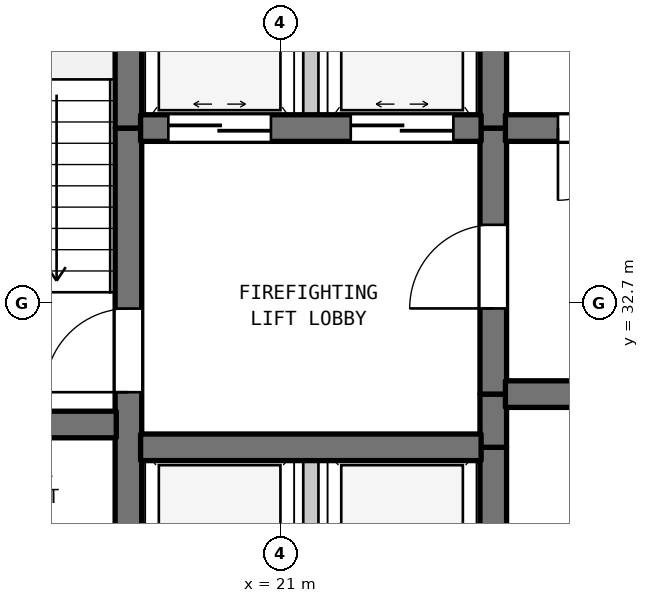
"""IFC4 building model, lengths in metres.
Left out: names, types, materials, properties, quantities, classifications, styles, units other than length and angle.
Written with IfcOpenShell. Run it as: python <this file> out.ifc"""

import sys

from ifc_helpers import new_model, si_unit, direction, frame, frame_2d, origin, place, context, subcontext, project, spatial, rectangle, extrude, element, fill, save


model = new_model("IFC4")
c1 = context("Model", 3, precision=1e-05, world=origin(), true_north=direction((0.0, 1.0)))
c2 = subcontext(c1, "Body", "Model", "MODEL_VIEW")
j1 = project(units=[si_unit("LENGTHUNIT", "METRE"), si_unit("PLANEANGLEUNIT", "RADIAN")], contexts=[c1])
p1 = place(None, origin())
s1 = spatial("IfcSite", under=j1, at=p1, CompositionType="ELEMENT")
p2 = place(p1, origin())
s2 = spatial("IfcBuilding", under=s1, at=p2, CompositionType="ELEMENT")
p3 = place(p2, frame((0.0, 0.0, 276.9)))
s3 = spatial("IfcBuildingStorey", under=s2, at=p3, CompositionType="ELEMENT", Elevation=276.9)
p4 = place(p3, frame((19.0, 29.5, 0.0), z_axis=(0.0, 0.0, 1.0), x_axis=(0.0, 1.0, 0.0)))
e1 = element("IfcWall", 1, at=p4, inside=s3, PredefinedType="SHEAR", context=c2, shape_type="SweptSolid", body=[
    extrude(rectangle(XDim=5.5, YDim=0.35, at=frame_2d((2.75, 0.0))), origin(), (0.0, 0.0, 1.0), 3.39),
])
p5 = place(p4, frame((2.025, 0.0, 0.0)))
e2 = element("IfcOpeningElement", 2, at=p5, cuts=e1, PredefinedType="OPENING", context=c2, shape_type="SweptSolid", body=[
    extrude(rectangle(XDim=1.1, YDim=2.15, at=frame_2d((0.55, 1.075))), frame((0.0, 0.185, 0.0), z_axis=(0.0, -1.0, 0.0), x_axis=(1.0, 0.0, 0.0)), (0.0, 0.0, 1.0), 0.37),
])
p6 = place(p3, frame((19.0, 35.0, 0.0), z_axis=(0.0, 0.0, 1.0), x_axis=(0.0, 1.0, 0.0)))
e3 = element("IfcWall", 3, at=p6, inside=s3, PredefinedType="SHEAR", context=c2, shape_type="SweptSolid", body=[
    extrude(rectangle(XDim=2.9, YDim=0.35, at=frame_2d((1.45, 0.0))), origin(), (0.0, 0.0, 1.0), 3.39),
])
p7 = place(p3, frame((21.4, 28.2, 0.0), z_axis=(0.0, 0.0, 1.0), x_axis=(0.0, 1.0, 0.0)))
e4 = element("IfcWall", 4, at=p7, inside=s3, PredefinedType="STANDARD", context=c2, shape_type="SweptSolid", body=[
    extrude(rectangle(XDim=2.6, YDim=0.2, at=frame_2d((1.3, 0.0))), origin(), (0.0, 0.0, 1.0), 3.39),
])
p8 = place(p3, frame((21.4, 35.0, 0.0), z_axis=(0.0, 0.0, 1.0), x_axis=(0.0, 1.0, 0.0)))
e5 = element("IfcWall", 5, at=p8, inside=s3, PredefinedType="STANDARD", context=c2, shape_type="SweptSolid", body=[
    extrude(rectangle(XDim=2.9, YDim=0.2, at=frame_2d((1.45, 0.0))), origin(), (0.0, 0.0, 1.0), 3.39),
])
p9 = place(p3, frame((23.8, 28.2, 0.0), z_axis=(0.0, 0.0, 1.0), x_axis=(0.0, 1.0, 0.0)))
e6 = element("IfcWall", 6, at=p9, inside=s3, PredefinedType="SHEAR", context=c2, shape_type="SweptSolid", body=[
    extrude(rectangle(XDim=2.6, YDim=0.35, at=frame_2d((1.3, 0.0))), origin(), (0.0, 0.0, 1.0), 3.39),
])
p10 = place(p3, frame((23.8, 30.8, 0.0), z_axis=(0.0, 0.0, 1.0), x_axis=(0.0, 1.0, 0.0)))
e7 = element("IfcWall", 7, at=p10, inside=s3, PredefinedType="SHEAR", context=c2, shape_type="SweptSolid", body=[
    extrude(rectangle(XDim=0.7, YDim=0.35, at=frame_2d((0.35, 0.0))), origin(), (0.0, 0.0, 1.0), 3.39),
])
p11 = place(p3, frame((23.8, 31.5, 0.0), z_axis=(0.0, 0.0, 1.0), x_axis=(0.0, 1.0, 0.0)))
e8 = element("IfcWall", 8, at=p11, inside=s3, PredefinedType="SHEAR", context=c2, shape_type="SweptSolid", body=[
    extrude(rectangle(XDim=3.5, YDim=0.35, at=frame_2d((1.75, 0.0))), origin(), (0.0, 0.0, 1.0), 3.39),
])
p12 = place(p11, frame((1.127, 0.0, 0.0)))
e9 = element("IfcOpeningElement", 9, at=p12, cuts=e8, PredefinedType="OPENING", context=c2, shape_type="SweptSolid", body=[
    extrude(rectangle(XDim=1.1, YDim=2.15, at=frame_2d((0.55, 1.075))), frame((0.0, 0.185, 0.0), z_axis=(0.0, -1.0, 0.0), x_axis=(1.0, 0.0, 0.0)), (0.0, 0.0, 1.0), 0.37),
])
p13 = place(p3, frame((23.8, 35.0, 0.0), z_axis=(0.0, 0.0, 1.0), x_axis=(0.0, 1.0, 0.0)))
e10 = element("IfcWall", 10, at=p13, inside=s3, PredefinedType="SHEAR", context=c2, shape_type="SweptSolid", body=[
    extrude(rectangle(XDim=2.9, YDim=0.35, at=frame_2d((1.45, 0.0))), origin(), (0.0, 0.0, 1.0), 3.39),
])
p14 = place(p3, frame((19.16, 30.8, 0.0), z_axis=(0.0, 0.0, 1.0), x_axis=(1.0, 0.0, 0.0)))
e11 = element("IfcWall", 11, at=p14, inside=s3, PredefinedType="SHEAR", context=c2, shape_type="SweptSolid", body=[
    extrude(rectangle(XDim=4.48, YDim=0.35, at=frame_2d((2.24, 0.0))), origin(), (0.0, 0.0, 1.0), 3.39),
])
p15 = place(p3, frame((15.16, 31.1, 0.0), z_axis=(0.0, 0.0, 1.0), x_axis=(1.0, 0.0, 0.0)))
e12 = element("IfcWall", 12, at=p15, inside=s3, PredefinedType="SHEAR", context=c2, shape_type="SweptSolid", body=[
    extrude(rectangle(XDim=3.68, YDim=0.35, at=frame_2d((1.84, 0.0))), origin(), (0.0, 0.0, 1.0), 3.39),
])
p16 = place(p3, frame((23.96, 31.5, 0.0), z_axis=(0.0, 0.0, 1.0), x_axis=(1.0, 0.0, 0.0)))
e13 = element("IfcWall", 13, at=p16, inside=s3, PredefinedType="SHEAR", context=c2, shape_type="SweptSolid", body=[
    extrude(rectangle(XDim=3.18, YDim=0.35, at=frame_2d((1.59, 0.0))), origin(), (0.0, 0.0, 1.0), 3.39),
])
p17 = place(p16, frame((1.094, 0.0, 0.0)))
e14 = element("IfcOpeningElement", 14, at=p17, cuts=e13, PredefinedType="OPENING", context=c2, shape_type="SweptSolid", body=[
    extrude(rectangle(XDim=0.85, YDim=2.1, at=frame_2d((0.425, 1.05))), frame((0.0, 0.185, 0.0), z_axis=(0.0, -1.0, 0.0), x_axis=(1.0, 0.0, 0.0)), (0.0, 0.0, 1.0), 0.37),
])
p18 = place(p3, frame((19.16, 35.0, 0.0), z_axis=(0.0, 0.0, 1.0), x_axis=(1.0, 0.0, 0.0)))
e15 = element("IfcWall", 15, at=p18, inside=s3, PredefinedType="SHEAR", context=c2, shape_type="SweptSolid", body=[
    extrude(rectangle(XDim=4.48, YDim=0.35, at=frame_2d((2.24, 0.0))), origin(), (0.0, 0.0, 1.0), 3.39),
])
p19 = place(p18, frame((0.365, 0.0, 0.0)))
e16 = element("IfcOpeningElement", 16, at=p19, cuts=e15, PredefinedType="OPENING", context=c2, shape_type="SweptSolid", body=[
    extrude(rectangle(XDim=1.35, YDim=2.2, at=frame_2d((0.675, 1.1))), frame((0.0, 0.185, 0.0), z_axis=(0.0, -1.0, 0.0), x_axis=(1.0, 0.0, 0.0)), (0.0, 0.0, 1.0), 0.37),
])
p20 = place(p18, frame((2.765, 0.0, 0.0)))
e17 = element("IfcOpeningElement", 17, at=p20, cuts=e15, PredefinedType="OPENING", context=c2, shape_type="SweptSolid", body=[
    extrude(rectangle(XDim=1.35, YDim=2.2, at=frame_2d((0.675, 1.1))), frame((0.0, 0.185, 0.0), z_axis=(0.0, -1.0, 0.0), x_axis=(1.0, 0.0, 0.0)), (0.0, 0.0, 1.0), 0.37),
])
p21 = place(p3, frame((23.96, 35.0, 0.0), z_axis=(0.0, 0.0, 1.0), x_axis=(1.0, 0.0, 0.0)))
e18 = element("IfcWall", 18, at=p21, inside=s3, PredefinedType="SHEAR", context=c2, shape_type="SweptSolid", body=[
    extrude(rectangle(XDim=2.595, YDim=0.35, at=frame_2d((1.297, 0.0))), origin(), (0.0, 0.0, 1.0), 3.39),
])
p22 = place(p21, frame((0.691, 0.0, 0.0)))
e19 = element("IfcOpeningElement", 19, at=p22, cuts=e18, PredefinedType="OPENING", context=c2, shape_type="SweptSolid", body=[
    extrude(rectangle(XDim=0.95, YDim=2.15, at=frame_2d((0.475, 1.075))), frame((0.0, 0.185, 0.0), z_axis=(0.0, -1.0, 0.0), x_axis=(1.0, 0.0, 0.0)), (0.0, 0.0, 1.0), 0.37),
])
p23 = place(p5, origin())
e20 = element("IfcDoor", 20, at=p23, inside=s3, OperationType="SINGLE_SWING_LEFT", PredefinedType="DOOR", context=c2, shape_type="SweptSolid", body=[
    extrude(rectangle(XDim=1.1, YDim=2.15, at=frame_2d((0.55, 1.075))), frame((0.0, 0.025, 0.0), z_axis=(0.0, -1.0, 0.0), x_axis=(1.0, 0.0, 0.0)), (0.0, 0.0, 1.0), 0.05),
])
fill(e2, e20)
p24 = place(p12, origin())
e21 = element("IfcDoor", 21, at=p24, inside=s3, OperationType="SINGLE_SWING_LEFT", PredefinedType="DOOR", context=c2, shape_type="SweptSolid", body=[
    extrude(rectangle(XDim=1.1, YDim=2.15, at=frame_2d((0.55, 1.075))), frame((0.0, 0.025, 0.0), z_axis=(0.0, -1.0, 0.0), x_axis=(1.0, 0.0, 0.0)), (0.0, 0.0, 1.0), 0.05),
])
fill(e9, e21)
p25 = place(p19, origin())
e22 = element("IfcDoor", 22, at=p25, inside=s3, OperationType="DOUBLE_DOOR_SLIDING", PredefinedType="DOOR", context=c2, shape_type="SweptSolid", body=[
    extrude(rectangle(XDim=1.35, YDim=2.2, at=frame_2d((0.675, 1.1))), frame((0.0, 0.025, 0.0), z_axis=(0.0, -1.0, 0.0), x_axis=(1.0, 0.0, 0.0)), (0.0, 0.0, 1.0), 0.05),
])
fill(e16, e22)
p26 = place(p20, origin())
e23 = element("IfcDoor", 23, at=p26, inside=s3, OperationType="DOUBLE_DOOR_SLIDING", PredefinedType="DOOR", context=c2, shape_type="SweptSolid", body=[
    extrude(rectangle(XDim=1.35, YDim=2.2, at=frame_2d((0.675, 1.1))), frame((0.0, 0.025, 0.0), z_axis=(0.0, -1.0, 0.0), x_axis=(1.0, 0.0, 0.0)), (0.0, 0.0, 1.0), 0.05),
])
fill(e17, e23)
p27 = place(p22, frame((0.95, 0.0, 0.0), z_axis=(0.0, 0.0, 1.0), x_axis=(-1.0, 0.0, 0.0)))
e24 = element("IfcDoor", 24, at=p27, inside=s3, OperationType="SINGLE_SWING_LEFT", PredefinedType="DOOR", context=c2, shape_type="SweptSolid", body=[
    extrude(rectangle(XDim=0.95, YDim=2.15, at=frame_2d((0.475, 1.075))), frame((0.0, 0.025, 0.0), z_axis=(0.0, -1.0, 0.0), x_axis=(1.0, 0.0, 0.0)), (0.0, 0.0, 1.0), 0.05),
])
fill(e19, e24)
save(model, sys.argv[1])
